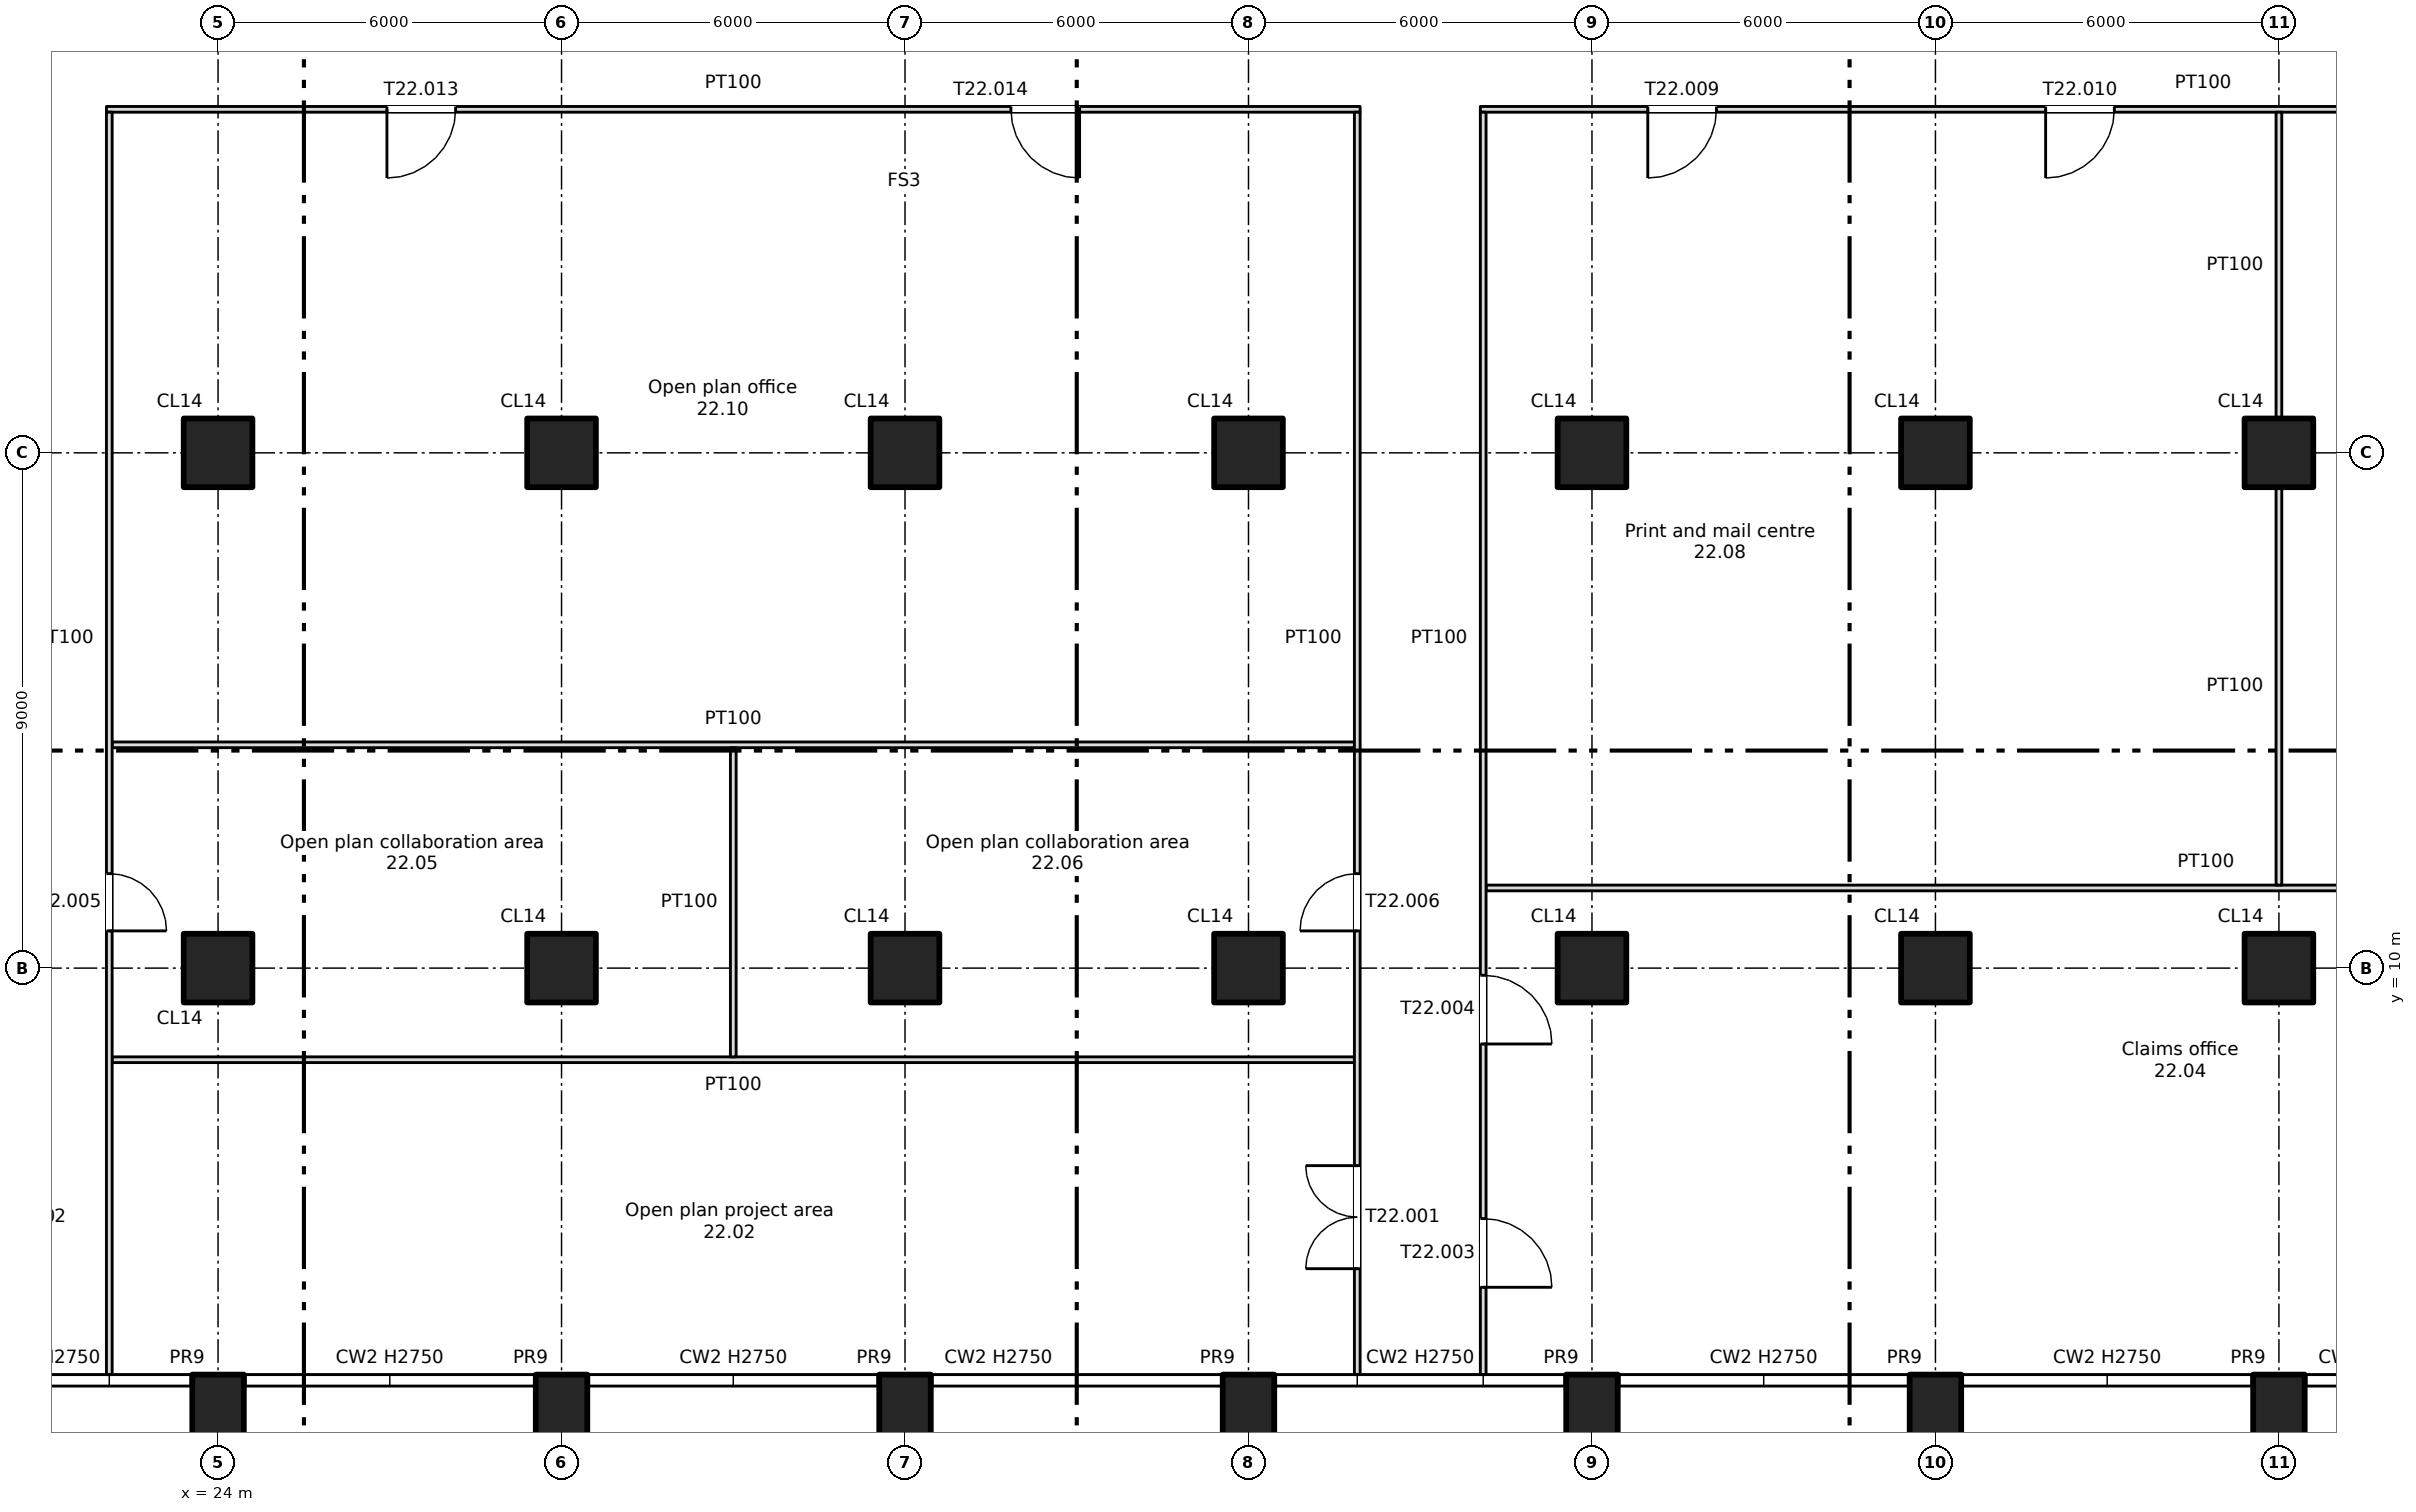
"""IFC4 building model, lengths in metres.
Left out: names, types, materials, properties, quantities, classifications, styles, units other than length and angle.
Written with IfcOpenShell. Run it as: python <this file> out.ifc"""

import sys

from ifc_helpers import new_model, si_unit, direction, frame, frame_2d, origin, origin_2d, place, context, subcontext, project, spatial, rectangle, extrude, element, fill, save


model = new_model("IFC4")
c1 = context("Model", 3, precision=1e-05, world=origin(), true_north=direction((0.0, 1.0)))
c2 = subcontext(c1, "Body", "Model", "MODEL_VIEW")
j1 = project(units=[si_unit("LENGTHUNIT", "METRE"), si_unit("PLANEANGLEUNIT", "RADIAN")], contexts=[c1])
p1 = place(None, origin())
s1 = spatial("IfcSite", under=j1, at=p1, CompositionType="ELEMENT")
p2 = place(p1, origin())
s2 = spatial("IfcBuilding", under=s1, at=p2, CompositionType="ELEMENT")
p3 = place(p2, frame((0.0, 0.0, 147.5)))
s3 = spatial("IfcBuildingStorey", under=s2, at=p3, CompositionType="ELEMENT", Elevation=147.5)
for number, where, z_axis, x_axis in (
    (1, (24.0, 2.2, -0.4), (0.0, 0.0, 1.0), (1.0, 0.0, 0.0)),
    (2, (30.0, 2.2, -0.4), (0.0, 0.0, 1.0), (1.0, 0.0, 0.0)),
    (3, (36.0, 2.2, -0.4), (0.0, 0.0, 1.0), (1.0, 0.0, 0.0)),
    (4, (42.0, 2.2, -0.4), (0.0, 0.0, 1.0), (1.0, 0.0, 0.0)),
    (5, (48.0, 2.2, -0.4), (0.0, 0.0, 1.0), (1.0, 0.0, 0.0)),
    (6, (54.0, 2.2, -0.4), (0.0, 0.0, 1.0), (1.0, 0.0, 0.0)),
    (7, (60.0, 2.2, -0.4), (0.0, 0.0, 1.0), (1.0, 0.0, 0.0)),
):
    element("IfcColumn", number, at=place(p3, frame(where, z_axis=z_axis, x_axis=x_axis)), inside=s3, PredefinedType="COLUMN", context=c2, shape_type="SweptSolid", body=[
        extrude(rectangle(XDim=0.9, YDim=1.4, at=origin_2d()), origin(), (0.0, 0.0, 1.0), 3.75),
    ])
for number, where, z_axis, x_axis in (
    (8, (24.0, 10.0, 0.0), (0.0, 0.0, 1.0), (1.0, 0.0, 0.0)),
    (9, (24.0, 19.0, 0.0), (0.0, 0.0, 1.0), (1.0, 0.0, 0.0)),
    (10, (30.0, 10.0, 0.0), (0.0, 0.0, 1.0), (1.0, 0.0, 0.0)),
    (11, (30.0, 19.0, 0.0), (0.0, 0.0, 1.0), (1.0, 0.0, 0.0)),
    (12, (36.0, 10.0, 0.0), (0.0, 0.0, 1.0), (1.0, 0.0, 0.0)),
    (13, (36.0, 19.0, 0.0), (0.0, 0.0, 1.0), (1.0, 0.0, 0.0)),
    (14, (42.0, 10.0, 0.0), (0.0, 0.0, 1.0), (1.0, 0.0, 0.0)),
    (15, (42.0, 19.0, 0.0), (0.0, 0.0, 1.0), (1.0, 0.0, 0.0)),
    (16, (48.0, 10.0, 0.0), (0.0, 0.0, 1.0), (1.0, 0.0, 0.0)),
    (17, (48.0, 19.0, 0.0), (0.0, 0.0, 1.0), (1.0, 0.0, 0.0)),
    (18, (54.0, 10.0, 0.0), (0.0, 0.0, 1.0), (1.0, 0.0, 0.0)),
    (19, (54.0, 19.0, 0.0), (0.0, 0.0, 1.0), (1.0, 0.0, 0.0)),
    (20, (60.0, 10.0, 0.0), (0.0, 0.0, 1.0), (1.0, 0.0, 0.0)),
    (21, (60.0, 19.0, 0.0), (0.0, 0.0, 1.0), (1.0, 0.0, 0.0)),
):
    element("IfcColumn", number, at=place(p3, frame(where, z_axis=z_axis, x_axis=x_axis)), inside=s3, PredefinedType="COLUMN", context=c2, shape_type="SweptSolid", body=[
        extrude(rectangle(XDim=1.2, YDim=1.2, at=origin_2d()), origin(), (0.0, 0.0, 1.0), 3.35),
    ])
p4 = place(p3, frame((22.15, 8.4, 0.0), z_axis=(0.0, 0.0, 1.0), x_axis=(1.0, 0.0, 0.0)))
e22 = element("IfcWall", 22, at=p4, inside=s3, PredefinedType="PARTITIONING", context=c2, shape_type="SweptSolid", body=[
    extrude(rectangle(XDim=21.7, YDim=0.1, at=frame_2d((10.85, 0.0))), origin(), (0.0, 0.0, 1.0), 3.35),
])
p5 = place(p3, frame((46.15, 11.4, 0.0), z_axis=(0.0, 0.0, 1.0), x_axis=(1.0, 0.0, 0.0)))
e23 = element("IfcWall", 23, at=p5, inside=s3, PredefinedType="PARTITIONING", context=c2, shape_type="SweptSolid", body=[
    extrude(rectangle(XDim=25.15, YDim=0.1, at=frame_2d((12.575, 0.0))), origin(), (0.0, 0.0, 1.0), 3.35),
])
p6 = place(p3, frame((22.15, 13.9, 0.0), z_axis=(0.0, 0.0, 1.0), x_axis=(1.0, 0.0, 0.0)))
e24 = element("IfcWall", 24, at=p6, inside=s3, PredefinedType="PARTITIONING", context=c2, shape_type="SweptSolid", body=[
    extrude(rectangle(XDim=21.7, YDim=0.1, at=frame_2d((10.85, 0.0))), origin(), (0.0, 0.0, 1.0), 3.35),
])
p7 = place(p3, frame((22.05, 25.0, 0.0), z_axis=(0.0, 0.0, 1.0), x_axis=(1.0, 0.0, 0.0)))
e25 = element("IfcWall", 25, at=p7, inside=s3, PredefinedType="PARTITIONING", context=c2, shape_type="SweptSolid", body=[
    extrude(rectangle(XDim=21.9, YDim=0.1, at=frame_2d((10.95, 0.0))), origin(), (0.0, 0.0, 1.0), 3.35),
])
p8 = place(p7, frame((4.9, 0.0, 0.0)))
e26 = element("IfcOpeningElement", 26, at=p8, cuts=e25, PredefinedType="OPENING", context=c2, shape_type="SweptSolid", body=[
    extrude(rectangle(XDim=1.2, YDim=2.1, at=frame_2d((0.6, 1.05))), frame((0.0, 0.06, 0.0), z_axis=(0.0, -1.0, 0.0), x_axis=(1.0, 0.0, 0.0)), (0.0, 0.0, 1.0), 0.12),
])
p9 = place(p7, frame((15.8, 0.0, 0.0)))
e27 = element("IfcOpeningElement", 27, at=p9, cuts=e25, PredefinedType="OPENING", context=c2, shape_type="SweptSolid", body=[
    extrude(rectangle(XDim=1.2, YDim=2.1, at=frame_2d((0.6, 1.05))), frame((0.0, 0.06, 0.0), z_axis=(0.0, -1.0, 0.0), x_axis=(1.0, 0.0, 0.0)), (0.0, 0.0, 1.0), 0.12),
])
p10 = place(p3, frame((46.05, 25.0, 0.0), z_axis=(0.0, 0.0, 1.0), x_axis=(1.0, 0.0, 0.0)))
e28 = element("IfcWall", 28, at=p10, inside=s3, PredefinedType="PARTITIONING", context=c2, shape_type="SweptSolid", body=[
    extrude(rectangle(XDim=25.25, YDim=0.1, at=frame_2d((12.625, 0.0))), origin(), (0.0, 0.0, 1.0), 3.35),
])
p11 = place(p10, frame((2.925, 0.0, 0.0)))
e29 = element("IfcOpeningElement", 29, at=p11, cuts=e28, PredefinedType="OPENING", context=c2, shape_type="SweptSolid", body=[
    extrude(rectangle(XDim=1.2, YDim=2.1, at=frame_2d((0.6, 1.05))), frame((0.0, 0.06, 0.0), z_axis=(0.0, -1.0, 0.0), x_axis=(1.0, 0.0, 0.0)), (0.0, 0.0, 1.0), 0.12),
])
p12 = place(p10, frame((9.875, 0.0, 0.0)))
e30 = element("IfcOpeningElement", 30, at=p12, cuts=e28, PredefinedType="OPENING", context=c2, shape_type="SweptSolid", body=[
    extrude(rectangle(XDim=1.2, YDim=2.1, at=frame_2d((0.6, 1.05))), frame((0.0, 0.06, 0.0), z_axis=(0.0, -1.0, 0.0), x_axis=(1.0, 0.0, 0.0)), (0.0, 0.0, 1.0), 0.12),
])
p13 = place(p10, frame((16.175, 0.0, 0.0)))
e31 = element("IfcOpeningElement", 31, at=p13, cuts=e28, PredefinedType="OPENING", context=c2, shape_type="SweptSolid", body=[
    extrude(rectangle(XDim=1.2, YDim=2.1, at=frame_2d((0.6, 1.05))), frame((0.0, 0.06, 0.0), z_axis=(0.0, -1.0, 0.0), x_axis=(1.0, 0.0, 0.0)), (0.0, 0.0, 1.0), 0.12),
])
p14 = place(p10, frame((21.825, 0.0, 0.0)))
e32 = element("IfcOpeningElement", 32, at=p14, cuts=e28, PredefinedType="OPENING", context=c2, shape_type="SweptSolid", body=[
    extrude(rectangle(XDim=1.2, YDim=2.1, at=frame_2d((0.6, 1.05))), frame((0.0, 0.06, 0.0), z_axis=(0.0, -1.0, 0.0), x_axis=(1.0, 0.0, 0.0)), (0.0, 0.0, 1.0), 0.12),
])
p15 = place(p3, frame((22.1, 2.9, 0.0), z_axis=(0.0, 0.0, 1.0), x_axis=(0.0, 1.0, 0.0)))
e33 = element("IfcWall", 33, at=p15, inside=s3, PredefinedType="PARTITIONING", context=c2, shape_type="SweptSolid", body=[
    extrude(rectangle(XDim=22.05, YDim=0.1, at=frame_2d((11.025, 0.0))), origin(), (0.0, 0.0, 1.0), 3.35),
])
p16 = place(p15, frame((7.75, 0.0, 0.0)))
e34 = element("IfcOpeningElement", 34, at=p16, cuts=e33, PredefinedType="OPENING", context=c2, shape_type="SweptSolid", body=[
    extrude(rectangle(XDim=1.0, YDim=2.1, at=frame_2d((0.5, 1.05))), frame((0.0, 0.06, 0.0), z_axis=(0.0, -1.0, 0.0), x_axis=(1.0, 0.0, 0.0)), (0.0, 0.0, 1.0), 0.12),
])
p17 = place(p3, frame((33.0, 8.45, 0.0), z_axis=(0.0, 0.0, 1.0), x_axis=(0.0, 1.0, 0.0)))
e35 = element("IfcWall", 35, at=p17, inside=s3, PredefinedType="PARTITIONING", context=c2, shape_type="SweptSolid", body=[
    extrude(rectangle(XDim=5.4, YDim=0.1, at=frame_2d((2.7, 0.0))), origin(), (0.0, 0.0, 1.0), 3.35),
])
p18 = place(p3, frame((43.9, 2.9, 0.0), z_axis=(0.0, 0.0, 1.0), x_axis=(0.0, 1.0, 0.0)))
e36 = element("IfcWall", 36, at=p18, inside=s3, PredefinedType="PARTITIONING", context=c2, shape_type="SweptSolid", body=[
    extrude(rectangle(XDim=22.05, YDim=0.1, at=frame_2d((11.025, 0.0))), origin(), (0.0, 0.0, 1.0), 3.35),
])
p19 = place(p18, frame((1.85, 0.0, 0.0)))
e37 = element("IfcOpeningElement", 37, at=p19, cuts=e36, PredefinedType="OPENING", context=c2, shape_type="SweptSolid", body=[
    extrude(rectangle(XDim=1.8, YDim=2.1, at=frame_2d((0.9, 1.05))), frame((0.0, 0.06, 0.0), z_axis=(0.0, -1.0, 0.0), x_axis=(1.0, 0.0, 0.0)), (0.0, 0.0, 1.0), 0.12),
])
p20 = place(p18, frame((7.75, 0.0, 0.0)))
e38 = element("IfcOpeningElement", 38, at=p20, cuts=e36, PredefinedType="OPENING", context=c2, shape_type="SweptSolid", body=[
    extrude(rectangle(XDim=1.0, YDim=2.1, at=frame_2d((0.5, 1.05))), frame((0.0, 0.06, 0.0), z_axis=(0.0, -1.0, 0.0), x_axis=(1.0, 0.0, 0.0)), (0.0, 0.0, 1.0), 0.12),
])
p21 = place(p3, frame((46.1, 2.9, 0.0), z_axis=(0.0, 0.0, 1.0), x_axis=(0.0, 1.0, 0.0)))
e39 = element("IfcWall", 39, at=p21, inside=s3, PredefinedType="PARTITIONING", context=c2, shape_type="SweptSolid", body=[
    extrude(rectangle(XDim=22.05, YDim=0.1, at=frame_2d((11.025, 0.0))), origin(), (0.0, 0.0, 1.0), 3.35),
])
p22 = place(p21, frame((1.525, 0.0, 0.0)))
e40 = element("IfcOpeningElement", 40, at=p22, cuts=e39, PredefinedType="OPENING", context=c2, shape_type="SweptSolid", body=[
    extrude(rectangle(XDim=1.2, YDim=2.1, at=frame_2d((0.6, 1.05))), frame((0.0, 0.06, 0.0), z_axis=(0.0, -1.0, 0.0), x_axis=(1.0, 0.0, 0.0)), (0.0, 0.0, 1.0), 0.12),
])
p23 = place(p21, frame((5.775, 0.0, 0.0)))
e41 = element("IfcOpeningElement", 41, at=p23, cuts=e39, PredefinedType="OPENING", context=c2, shape_type="SweptSolid", body=[
    extrude(rectangle(XDim=1.2, YDim=2.1, at=frame_2d((0.6, 1.05))), frame((0.0, 0.06, 0.0), z_axis=(0.0, -1.0, 0.0), x_axis=(1.0, 0.0, 0.0)), (0.0, 0.0, 1.0), 0.12),
])
p24 = place(p3, frame((60.0, 11.45, 0.0), z_axis=(0.0, 0.0, 1.0), x_axis=(0.0, 1.0, 0.0)))
e42 = element("IfcWall", 42, at=p24, inside=s3, PredefinedType="PARTITIONING", context=c2, shape_type="SweptSolid", body=[
    extrude(rectangle(XDim=6.95, YDim=0.1, at=frame_2d((3.475, 0.0))), origin(), (0.0, 0.0, 1.0), 3.35),
])
p25 = place(p3, frame((60.0, 19.6, 0.0), z_axis=(0.0, 0.0, 1.0), x_axis=(0.0, 1.0, 0.0)))
e43 = element("IfcWall", 43, at=p25, inside=s3, PredefinedType="PARTITIONING", context=c2, shape_type="SweptSolid", body=[
    extrude(rectangle(XDim=5.35, YDim=0.1, at=frame_2d((2.675, 0.0))), origin(), (0.0, 0.0, 1.0), 3.35),
])
p26 = place(p19, origin())
e44 = element("IfcDoor", 44, at=p26, inside=s3, OperationType="DOUBLE_DOOR_SINGLE_SWING", PredefinedType="DOOR", context=c2, shape_type="SweptSolid", body=[
    extrude(rectangle(XDim=1.8, YDim=2.1, at=frame_2d((0.9, 1.05))), frame((0.0, 0.025, 0.0), z_axis=(0.0, -1.0, 0.0), x_axis=(1.0, 0.0, 0.0)), (0.0, 0.0, 1.0), 0.05),
])
fill(e37, e44)
p27 = place(p22, origin())
e45 = element("IfcDoor", 45, at=p27, inside=s3, OperationType="SINGLE_SWING_LEFT", PredefinedType="DOOR", context=c2, shape_type="SweptSolid", body=[
    extrude(rectangle(XDim=1.2, YDim=2.1, at=frame_2d((0.6, 1.05))), frame((0.0, 0.025, 0.0), z_axis=(0.0, -1.0, 0.0), x_axis=(1.0, 0.0, 0.0)), (0.0, 0.0, 1.0), 0.05),
])
fill(e40, e45)
p28 = place(p23, origin())
e46 = element("IfcDoor", 46, at=p28, inside=s3, OperationType="SINGLE_SWING_LEFT", PredefinedType="DOOR", context=c2, shape_type="SweptSolid", body=[
    extrude(rectangle(XDim=1.2, YDim=2.1, at=frame_2d((0.6, 1.05))), frame((0.0, 0.025, 0.0), z_axis=(0.0, -1.0, 0.0), x_axis=(1.0, 0.0, 0.0)), (0.0, 0.0, 1.0), 0.05),
])
fill(e41, e46)
p29 = place(p16, origin())
e47 = element("IfcDoor", 47, at=p29, inside=s3, OperationType="SINGLE_SWING_LEFT", PredefinedType="DOOR", context=c2, shape_type="SweptSolid", body=[
    extrude(rectangle(XDim=1.0, YDim=2.1, at=frame_2d((0.5, 1.05))), frame((0.0, 0.025, 0.0), z_axis=(0.0, -1.0, 0.0), x_axis=(1.0, 0.0, 0.0)), (0.0, 0.0, 1.0), 0.05),
])
fill(e34, e47)
p30 = place(p20, origin())
e48 = element("IfcDoor", 48, at=p30, inside=s3, OperationType="SINGLE_SWING_LEFT", PredefinedType="DOOR", context=c2, shape_type="SweptSolid", body=[
    extrude(rectangle(XDim=1.0, YDim=2.1, at=frame_2d((0.5, 1.05))), frame((0.0, 0.025, 0.0), z_axis=(0.0, -1.0, 0.0), x_axis=(1.0, 0.0, 0.0)), (0.0, 0.0, 1.0), 0.05),
])
fill(e38, e48)
p31 = place(p11, origin())
e49 = element("IfcDoor", 49, at=p31, inside=s3, OperationType="SINGLE_SWING_LEFT", PredefinedType="DOOR", context=c2, shape_type="SweptSolid", body=[
    extrude(rectangle(XDim=1.2, YDim=2.1, at=frame_2d((0.6, 1.05))), frame((0.0, 0.025, 0.0), z_axis=(0.0, -1.0, 0.0), x_axis=(1.0, 0.0, 0.0)), (0.0, 0.0, 1.0), 0.05),
])
fill(e29, e49)
p32 = place(p12, origin())
e50 = element("IfcDoor", 50, at=p32, inside=s3, OperationType="SINGLE_SWING_LEFT", PredefinedType="DOOR", context=c2, shape_type="SweptSolid", body=[
    extrude(rectangle(XDim=1.2, YDim=2.1, at=frame_2d((0.6, 1.05))), frame((0.0, 0.025, 0.0), z_axis=(0.0, -1.0, 0.0), x_axis=(1.0, 0.0, 0.0)), (0.0, 0.0, 1.0), 0.05),
])
fill(e30, e50)
p33 = place(p8, origin())
e51 = element("IfcDoor", 51, at=p33, inside=s3, OperationType="SINGLE_SWING_LEFT", PredefinedType="DOOR", context=c2, shape_type="SweptSolid", body=[
    extrude(rectangle(XDim=1.2, YDim=2.1, at=frame_2d((0.6, 1.05))), frame((0.0, 0.025, 0.0), z_axis=(0.0, -1.0, 0.0), x_axis=(1.0, 0.0, 0.0)), (0.0, 0.0, 1.0), 0.05),
])
fill(e26, e51)
p34 = place(p9, origin())
e52 = element("IfcDoor", 52, at=p34, inside=s3, OperationType="SINGLE_SWING_RIGHT", PredefinedType="DOOR", context=c2, shape_type="SweptSolid", body=[
    extrude(rectangle(XDim=1.2, YDim=2.1, at=frame_2d((0.6, 1.05))), frame((0.0, 0.025, 0.0), z_axis=(0.0, -1.0, 0.0), x_axis=(1.0, 0.0, 0.0)), (0.0, 0.0, 1.0), 0.05),
])
fill(e27, e52)
save(model, sys.argv[1])
